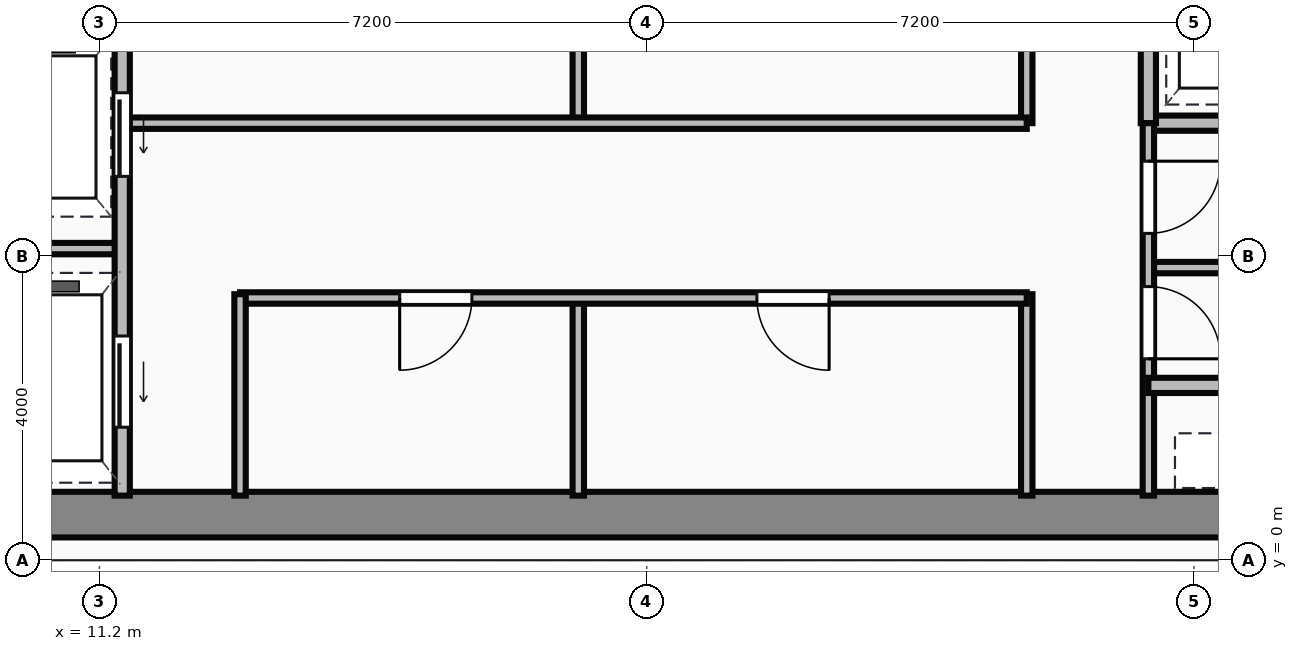
"""IFC4 building model, lengths in metres.
Left out: names, types, materials, properties, quantities, classifications, styles, units other than length and angle.
Written with IfcOpenShell. Run it as: python <this file> out.ifc"""

import sys

from ifc_helpers import new_model, si_unit, direction, frame, frame_2d, origin, place, context, subcontext, project, spatial, rectangle, extrude, source, transform, mapped, element, fill, save


model = new_model("IFC4")
c1 = context("Model", 3, precision=1e-05, world=origin(), true_north=direction((0.0, 1.0)))
c2 = subcontext(c1, "Body", "Model", "MODEL_VIEW")
j1 = project(units=[si_unit("LENGTHUNIT", "METRE"), si_unit("PLANEANGLEUNIT", "RADIAN")], contexts=[c1])
p1 = place(None, origin())
s1 = spatial("IfcSite", under=j1, at=p1, CompositionType="ELEMENT")
p2 = place(p1, origin())
s2 = spatial("IfcBuilding", under=s1, at=p2, CompositionType="ELEMENT")
p3 = place(p2, frame((0.0, 0.0, 232.4)))
s3 = spatial("IfcBuildingStorey", under=s2, at=p3, CompositionType="ELEMENT", Elevation=232.4)
m1 = source(origin(), c2, "Body", "SweptSolid", [
    extrude(rectangle(XDim=29.5, YDim=0.6, at=frame_2d((14.75, 0.0))), origin(), (0.0, 0.0, 1.0), 3.65),
])
p4 = place(p3, frame((4.5, 0.6, 0.0), z_axis=(0.0, 0.0, 1.0), x_axis=(1.0, 0.0, 0.0)))
e1 = element("IfcWall", 1, at=p4, inside=s3, PredefinedType="SHEAR", context=c2, shape_type="MappedRepresentation", body=[
    mapped(m1, transform((0.0, 0.0, 0.0))),
])
m2 = source(origin(), c2, "Body", "SweptSolid", [
    extrude(rectangle(XDim=9.6, YDim=0.2, at=frame_2d((4.8, 0.0))), origin(), (0.0, 0.0, 1.0), 3.35),
])
p5 = place(p3, frame((11.5, 0.85, 0.0), z_axis=(0.0, 0.0, 1.0), x_axis=(0.0, 1.0, 0.0)))
e2 = element("IfcWall", 2, at=p5, inside=s3, PredefinedType="PARTITIONING", context=c2, shape_type="MappedRepresentation", body=[
    mapped(m2, transform((0.0, 0.0, 0.0))),
])
p6 = place(p5, frame((4.2, 0.0, 0.0)))
e3 = element("IfcOpeningElement", 3, at=p6, cuts=e2, PredefinedType="OPENING", context=c2, shape_type="SweptSolid", body=[
    extrude(rectangle(XDim=1.1, YDim=2.15, at=frame_2d((0.55, 1.075))), frame((0.0, 0.11, 0.0), z_axis=(0.0, -1.0, 0.0), x_axis=(1.0, 0.0, 0.0)), (0.0, 0.0, 1.0), 0.22),
])
p7 = place(p5, frame((0.9, 0.0, 0.0)))
e4 = element("IfcOpeningElement", 4, at=p7, cuts=e2, PredefinedType="OPENING", context=c2, shape_type="SweptSolid", body=[
    extrude(rectangle(XDim=1.2, YDim=2.15, at=frame_2d((0.6, 1.075))), frame((0.0, 0.11, 0.0), z_axis=(0.0, -1.0, 0.0), x_axis=(1.0, 0.0, 0.0)), (0.0, 0.0, 1.0), 0.22),
])
m3 = source(origin(), c2, "Body", "SweptSolid", [
    extrude(rectangle(XDim=2.4, YDim=0.15, at=frame_2d((1.2, 0.0))), origin(), (0.0, 0.0, 1.0), 3.35),
])
p8 = place(p3, frame((9.1, 4.1, 0.0), z_axis=(0.0, 0.0, 1.0), x_axis=(1.0, 0.0, 0.0)))
e5 = element("IfcWall", 5, at=p8, inside=s3, PredefinedType="PARTITIONING", context=c2, shape_type="MappedRepresentation", body=[
    mapped(m3, transform((0.0, 0.0, 0.0))),
])
m4 = source(origin(), c2, "Body", "SweptSolid", [
    extrude(rectangle(XDim=2.65, YDim=0.15, at=frame_2d((1.325, 0.0))), origin(), (0.0, 0.0, 1.0), 3.35),
])
p9 = place(p3, frame((13.05, 0.85, 0.0), z_axis=(0.0, 0.0, 1.0), x_axis=(0.0, 1.0, 0.0)))
e6 = element("IfcWall", 6, at=p9, inside=s3, PredefinedType="PARTITIONING", context=c2, shape_type="MappedRepresentation", body=[
    mapped(m4, transform((0.0, 0.0, 0.0))),
])
m5 = source(origin(), c2, "Body", "SweptSolid", [
    extrude(rectangle(XDim=10.35, YDim=0.15, at=frame_2d((5.175, 0.0))), origin(), (0.0, 0.0, 1.0), 3.35),
])
p10 = place(p3, frame((13.05, 3.45, 0.0), z_axis=(0.0, 0.0, 1.0), x_axis=(1.0, 0.0, 0.0)))
e7 = element("IfcWall", 7, at=p10, inside=s3, PredefinedType="PARTITIONING", context=c2, shape_type="MappedRepresentation", body=[
    mapped(m5, transform((0.0, 0.0, 0.0))),
])
p11 = place(p10, frame((2.1, 0.0, 0.0)))
e8 = element("IfcOpeningElement", 8, at=p11, cuts=e7, PredefinedType="OPENING", context=c2, shape_type="SweptSolid", body=[
    extrude(rectangle(XDim=0.95, YDim=2.15, at=frame_2d((0.475, 1.075))), frame((0.0, 0.085, 0.0), z_axis=(0.0, -1.0, 0.0), x_axis=(1.0, 0.0, 0.0)), (0.0, 0.0, 1.0), 0.17),
])
p12 = place(p10, frame((6.8, 0.0, 0.0)))
e9 = element("IfcOpeningElement", 9, at=p12, cuts=e7, PredefinedType="OPENING", context=c2, shape_type="SweptSolid", body=[
    extrude(rectangle(XDim=0.95, YDim=2.15, at=frame_2d((0.475, 1.075))), frame((0.0, 0.085, 0.0), z_axis=(0.0, -1.0, 0.0), x_axis=(1.0, 0.0, 0.0)), (0.0, 0.0, 1.0), 0.17),
])
p13 = place(p3, frame((23.4, 0.85, 0.0), z_axis=(0.0, 0.0, 1.0), x_axis=(0.0, 1.0, 0.0)))
e10 = element("IfcWall", 10, at=p13, inside=s3, PredefinedType="PARTITIONING", context=c2, shape_type="MappedRepresentation", body=[
    mapped(m4, transform((0.0, 0.0, 0.0))),
])
m6 = source(origin(), c2, "Body", "SweptSolid", [
    extrude(rectangle(XDim=2.6, YDim=0.15, at=frame_2d((1.3, 0.0))), origin(), (0.0, 0.0, 1.0), 3.35),
])
p14 = place(p3, frame((17.5, 0.85, 0.0), z_axis=(0.0, 0.0, 1.0), x_axis=(0.0, 1.0, 0.0)))
e11 = element("IfcWall", 11, at=p14, inside=s3, PredefinedType="PARTITIONING", context=c2, shape_type="MappedRepresentation", body=[
    mapped(m6, transform((0.0, 0.0, 0.0))),
])
m7 = source(origin(), c2, "Body", "SweptSolid", [
    extrude(rectangle(XDim=11.85, YDim=0.15, at=frame_2d((5.925, 0.0))), origin(), (0.0, 0.0, 1.0), 3.35),
])
p15 = place(p3, frame((11.55, 5.75, 0.0), z_axis=(0.0, 0.0, 1.0), x_axis=(1.0, 0.0, 0.0)))
e12 = element("IfcWall", 12, at=p15, inside=s3, PredefinedType="PARTITIONING", context=c2, shape_type="MappedRepresentation", body=[
    mapped(m7, transform((0.0, 0.0, 0.0))),
])
m8 = source(origin(), c2, "Body", "SweptSolid", [
    extrude(rectangle(XDim=2.6, YDim=0.15, at=frame_2d((1.3, 0.0))), origin(), (0.0, 0.0, 1.0), 3.35),
])
p16 = place(p3, frame((23.4, 5.75, 0.0), z_axis=(0.0, 0.0, 1.0), x_axis=(0.0, 1.0, 0.0)))
e13 = element("IfcWall", 13, at=p16, inside=s3, PredefinedType="PARTITIONING", context=c2, shape_type="MappedRepresentation", body=[
    mapped(m8, transform((0.0, 0.0, 0.0))),
])
m9 = source(origin(), c2, "Body", "SweptSolid", [
    extrude(rectangle(XDim=2.5, YDim=0.15, at=frame_2d((1.25, 0.0))), origin(), (0.0, 0.0, 1.0), 3.35),
])
p17 = place(p3, frame((17.5, 5.8, 0.0), z_axis=(0.0, 0.0, 1.0), x_axis=(0.0, 1.0, 0.0)))
e14 = element("IfcWall", 14, at=p17, inside=s3, PredefinedType="PARTITIONING", context=c2, shape_type="MappedRepresentation", body=[
    mapped(m9, transform((0.0, 0.0, 0.0))),
])
m10 = source(origin(), c2, "Body", "SweptSolid", [
    extrude(rectangle(XDim=4.55, YDim=0.2, at=frame_2d((2.275, 0.0))), origin(), (0.0, 0.0, 1.0), 3.35),
])
p18 = place(p3, frame((25.0, 5.75, 0.0), z_axis=(0.0, 0.0, 1.0), x_axis=(1.0, 0.0, 0.0)))
e15 = element("IfcWall", 15, at=p18, inside=s3, PredefinedType="PARTITIONING", context=c2, shape_type="MappedRepresentation", body=[
    mapped(m10, transform((0.0, 0.0, 0.0))),
])
m11 = source(origin(), c2, "Body", "SweptSolid", [
    extrude(rectangle(XDim=2.6, YDim=0.2, at=frame_2d((1.3, 0.0))), origin(), (0.0, 0.0, 1.0), 3.35),
])
p19 = place(p3, frame((25.0, 5.75, 0.0), z_axis=(0.0, 0.0, 1.0), x_axis=(0.0, 1.0, 0.0)))
e16 = element("IfcWall", 16, at=p19, inside=s3, PredefinedType="PARTITIONING", context=c2, shape_type="MappedRepresentation", body=[
    mapped(m11, transform((0.0, 0.0, 0.0))),
])
m12 = source(origin(), c2, "Body", "SweptSolid", [
    extrude(rectangle(XDim=4.9, YDim=0.15, at=frame_2d((2.45, 0.0))), origin(), (0.0, 0.0, 1.0), 3.35),
])
p20 = place(p3, frame((25.0, 0.85, 0.0), z_axis=(0.0, 0.0, 1.0), x_axis=(0.0, 1.0, 0.0)))
e17 = element("IfcWall", 17, at=p20, inside=s3, PredefinedType="PARTITIONING", context=c2, shape_type="MappedRepresentation", body=[
    mapped(m12, transform((0.0, 0.0, 0.0))),
])
p21 = place(p20, frame((1.8, 0.0, 0.0)))
e18 = element("IfcOpeningElement", 18, at=p21, cuts=e17, PredefinedType="OPENING", context=c2, shape_type="SweptSolid", body=[
    extrude(rectangle(XDim=0.95, YDim=2.15, at=frame_2d((0.475, 1.075))), frame((0.0, 0.085, 0.0), z_axis=(0.0, -1.0, 0.0), x_axis=(1.0, 0.0, 0.0)), (0.0, 0.0, 1.0), 0.17),
])
p22 = place(p20, frame((3.45, 0.0, 0.0)))
e19 = element("IfcOpeningElement", 19, at=p22, cuts=e17, PredefinedType="OPENING", context=c2, shape_type="SweptSolid", body=[
    extrude(rectangle(XDim=0.95, YDim=2.15, at=frame_2d((0.475, 1.075))), frame((0.0, 0.085, 0.0), z_axis=(0.0, -1.0, 0.0), x_axis=(1.0, 0.0, 0.0)), (0.0, 0.0, 1.0), 0.17),
])
m13 = source(origin(), c2, "Body", "SweptSolid", [
    extrude(rectangle(XDim=2.4, YDim=0.2, at=frame_2d((1.2, 0.0))), origin(), (0.0, 0.0, 1.0), 3.35),
])
p23 = place(p3, frame((25.0, 2.3, 0.0), z_axis=(0.0, 0.0, 1.0), x_axis=(1.0, 0.0, 0.0)))
e20 = element("IfcWall", 20, at=p23, inside=s3, PredefinedType="PARTITIONING", context=c2, shape_type="MappedRepresentation", body=[
    mapped(m13, transform((0.0, 0.0, 0.0))),
])
m14 = source(origin(), c2, "Body", "SweptSolid", [
    extrude(rectangle(XDim=4.55, YDim=0.15, at=frame_2d((2.275, 0.0))), origin(), (0.0, 0.0, 1.0), 3.35),
])
p24 = place(p3, frame((25.0, 3.85, 0.0), z_axis=(0.0, 0.0, 1.0), x_axis=(1.0, 0.0, 0.0)))
e21 = element("IfcWall", 21, at=p24, inside=s3, PredefinedType="PARTITIONING", context=c2, shape_type="MappedRepresentation", body=[
    mapped(m14, transform((0.0, 0.0, 0.0))),
])
m15 = source(origin(), c2, "Body", "SweptSolid", [
    extrude(rectangle(XDim=1.1, YDim=2.15, at=frame_2d((0.55, 1.075))), frame((0.0, 0.025, 0.0), z_axis=(0.0, -1.0, 0.0), x_axis=(1.0, 0.0, 0.0)), (0.0, 0.0, 1.0), 0.05),
])
p25 = place(p6, frame((1.1, 0.0, 0.0), z_axis=(0.0, 0.0, 1.0), x_axis=(-1.0, 0.0, 0.0)))
e22 = element("IfcDoor", 22, at=p25, inside=s3, OperationType="SLIDING_TO_LEFT", PredefinedType="DOOR", context=c2, shape_type="MappedRepresentation", body=[
    mapped(m15, transform((0.0, 0.0, 0.0))),
])
fill(e3, e22)
m16 = source(origin(), c2, "Body", "SweptSolid", [
    extrude(rectangle(XDim=1.2, YDim=2.15, at=frame_2d((0.6, 1.075))), frame((0.0, 0.025, 0.0), z_axis=(0.0, -1.0, 0.0), x_axis=(1.0, 0.0, 0.0)), (0.0, 0.0, 1.0), 0.05),
])
p26 = place(p7, frame((1.2, 0.0, 0.0), z_axis=(0.0, 0.0, 1.0), x_axis=(-1.0, 0.0, 0.0)))
e23 = element("IfcDoor", 23, at=p26, inside=s3, OperationType="SLIDING_TO_LEFT", PredefinedType="DOOR", context=c2, shape_type="MappedRepresentation", body=[
    mapped(m16, transform((0.0, 0.0, 0.0))),
])
fill(e4, e23)
m17 = source(origin(), c2, "Body", "SweptSolid", [
    extrude(rectangle(XDim=0.95, YDim=2.15, at=frame_2d((0.475, 1.075))), frame((0.0, 0.025, 0.0), z_axis=(0.0, -1.0, 0.0), x_axis=(1.0, 0.0, 0.0)), (0.0, 0.0, 1.0), 0.05),
])
p27 = place(p11, origin())
e24 = element("IfcDoor", 24, at=p27, inside=s3, OperationType="SINGLE_SWING_LEFT", PredefinedType="DOOR", context=c2, shape_type="MappedRepresentation", body=[
    mapped(m17, transform((0.0, 0.0, 0.0))),
])
fill(e8, e24)
p28 = place(p12, origin())
e25 = element("IfcDoor", 25, at=p28, inside=s3, OperationType="SINGLE_SWING_RIGHT", PredefinedType="DOOR", context=c2, shape_type="MappedRepresentation", body=[
    mapped(m17, transform((0.0, 0.0, 0.0))),
])
fill(e9, e25)
p29 = place(p21, origin())
e26 = element("IfcDoor", 26, at=p29, inside=s3, OperationType="SINGLE_SWING_LEFT", PredefinedType="DOOR", context=c2, shape_type="MappedRepresentation", body=[
    mapped(m17, transform((0.0, 0.0, 0.0))),
])
fill(e18, e26)
p30 = place(p22, origin())
e27 = element("IfcDoor", 27, at=p30, inside=s3, OperationType="SINGLE_SWING_RIGHT", PredefinedType="DOOR", context=c2, shape_type="MappedRepresentation", body=[
    mapped(m17, transform((0.0, 0.0, 0.0))),
])
fill(e19, e27)
save(model, sys.argv[1])
